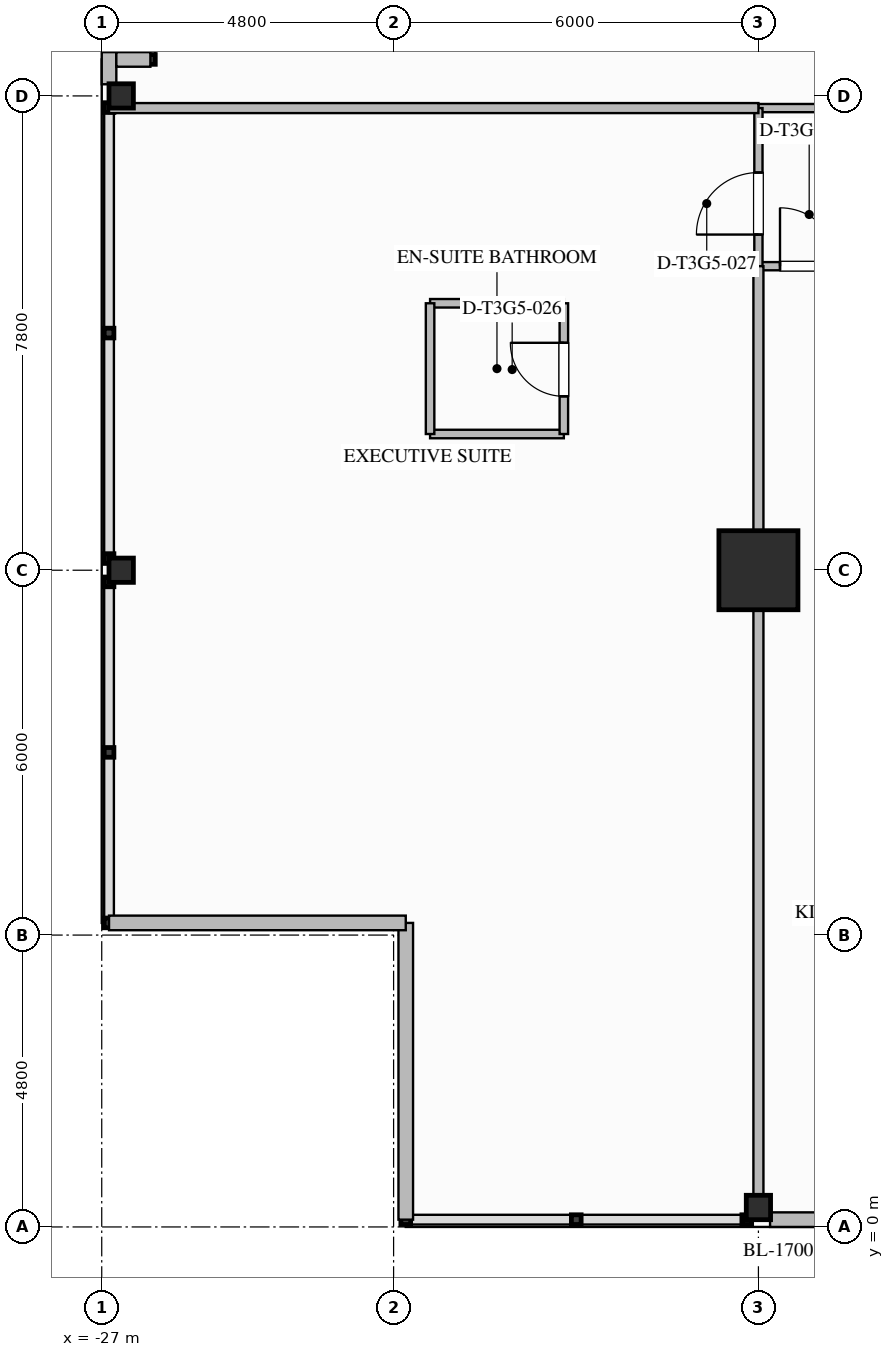
"""IFC4 building model, lengths in metres.
Left out: names, types, materials, properties, quantities, classifications, styles, units other than length and angle.
Written with IfcOpenShell. Run it as: python <this file> out.ifc"""

import sys

from ifc_helpers import new_model, si_unit, direction, frame, frame_2d, origin, origin_2d, place, context, subcontext, project, spatial, rectangle, i_section, extrude, element, fill, save


model = new_model("IFC4")
c1 = context("Model", 3, precision=1e-05, world=origin(), true_north=direction((0.0, 1.0)))
c2 = subcontext(c1, "Body", "Model", "MODEL_VIEW")
j1 = project(units=[si_unit("LENGTHUNIT", "METRE"), si_unit("PLANEANGLEUNIT", "RADIAN")], contexts=[c1])
p1 = place(None, origin())
s1 = spatial("IfcSite", under=j1, at=p1, CompositionType="ELEMENT")
p2 = place(p1, origin())
s2 = spatial("IfcBuilding", under=s1, at=p2, CompositionType="ELEMENT")
p3 = place(p2, frame((0.0, 0.0, 193.0)))
s3 = spatial("IfcBuildingStorey", under=s2, at=p3, CompositionType="ELEMENT", Elevation=193.0)
p4 = place(p3, frame((-16.2, 10.8, 0.0), z_axis=(0.0, 0.0, 1.0), x_axis=(1.0, 0.0, 0.0)))
e1 = element("IfcColumn", 1, at=p4, inside=s3, PredefinedType="COLUMN", context=c2, shape_type="SweptSolid", body=[
    extrude(rectangle(XDim=1.3, YDim=1.3, at=origin_2d()), origin(), (0.0, 0.0, 1.0), 3.55),
])
for number, where, z_axis, x_axis in (
    (2, (-26.68, 10.8, 0.0), (0.0, 0.0, 1.0), (1.0, 0.0, 0.0)),
    (3, (-26.68, 18.6, 0.0), (0.0, 0.0, 1.0), (1.0, 0.0, 0.0)),
    (4, (-16.2, 0.32, 0.0), (0.0, 0.0, 1.0), (0.0, 1.0, 0.0)),
):
    element("IfcColumn", number, at=place(p3, frame(where, z_axis=z_axis, x_axis=x_axis)), inside=s3, PredefinedType="COLUMN", context=c2, shape_type="SweptSolid", body=[
        extrude(i_section(OverallWidth=0.401, OverallDepth=0.399, WebThickness=0.025, FlangeThickness=0.04, FilletRadius=0.025, at=origin_2d()), origin(), (0.0, 0.0, 1.0), 3.547),
    ])
p5 = place(p3, frame((-26.88, 18.792, 0.0), z_axis=(0.0, 0.0, 1.0), x_axis=(0.0, 1.0, 0.0)))
e5 = element("IfcWall", 5, at=p5, inside=s3, PredefinedType="STANDARD", context=c2, shape_type="SweptSolid", body=[
    extrude(rectangle(XDim=0.528, YDim=0.24, at=frame_2d((0.264, 0.0))), origin(), (0.0, 0.0, 1.0), 3.29),
])
p6 = place(p3, frame((-8.592, 0.12, 0.0), z_axis=(0.0, 0.0, 1.0), x_axis=(-1.0, 0.0, 0.0)))
e6 = element("IfcWall", 6, at=p6, inside=s3, PredefinedType="STANDARD", context=c2, shape_type="SweptSolid", body=[
    extrude(rectangle(XDim=7.417, YDim=0.24, at=frame_2d((3.708, 0.0))), origin(), (0.0, 0.0, 1.0), 2.753),
])
p7 = place(p6, frame((1.808, 0.0, 0.0)))
e7 = element("IfcOpeningElement", 7, at=p7, cuts=e6, PredefinedType="OPENING", context=c2, shape_type="SweptSolid", body=[
    extrude(rectangle(XDim=1.0, YDim=2.2, at=frame_2d((0.5, 1.1))), frame((0.0, 0.13, 0.0), z_axis=(0.0, -1.0, 0.0), x_axis=(1.0, 0.0, 0.0)), (0.0, 0.0, 1.0), 0.26),
])
p8 = place(p6, frame((4.037, 0.0, 0.75)))
e8 = element("IfcOpeningElement", 8, at=p8, cuts=e6, PredefinedType="OPENING", context=c2, shape_type="SweptSolid", body=[
    extrude(rectangle(XDim=1.8, YDim=1.903, at=frame_2d((0.9, 0.952))), frame((0.0, 0.13, 0.0), z_axis=(0.0, -1.0, 0.0), x_axis=(1.0, 0.0, 0.0)), (0.0, 0.0, 1.0), 0.26),
])
for number, where, z_axis, x_axis in (
    (9, (-22.0, 0.12, 0.0), (0.0, 0.0, 1.0), (0.0, 1.0, 0.0)),
    (10, (-22.0, 5.0, 0.0), (0.0, 0.0, 1.0), (-1.0, 0.0, 0.0)),
):
    element("IfcWall", number, at=place(p3, frame(where, z_axis=z_axis, x_axis=x_axis)), inside=s3, PredefinedType="STANDARD", context=c2, shape_type="SweptSolid", body=[
        extrude(rectangle(XDim=4.88, YDim=0.24, at=frame_2d((2.44, 0.0))), origin(), (0.0, 0.0, 1.0), 3.29),
    ])
p9 = place(p3, frame((-26.76, 19.2, 0.0), z_axis=(0.0, 0.0, 1.0), x_axis=(1.0, 0.0, 0.0)))
e11 = element("IfcWall", 11, at=p9, inside=s3, PredefinedType="STANDARD", context=c2, shape_type="SweptSolid", body=[
    extrude(rectangle(XDim=0.56, YDim=0.24, at=frame_2d((0.28, 0.0))), origin(), (0.0, 0.0, 1.0), 3.29),
])
p10 = place(p3, frame((-16.2, 18.4, 0.0), z_axis=(0.0, 0.0, 1.0), x_axis=(1.0, 0.0, 0.0)))
e12 = element("IfcWall", 12, at=p10, inside=s3, PredefinedType="PARTITIONING", context=c2, shape_type="SweptSolid", body=[
    extrude(rectangle(XDim=5.5, YDim=0.135, at=frame_2d((2.75, 0.0))), origin(), (0.0, 0.0, 1.0), 2.667),
])
p11 = place(p3, frame((-16.2, 15.8, 0.0), z_axis=(0.0, 0.0, 1.0), x_axis=(1.0, 0.0, 0.0)))
e13 = element("IfcWall", 13, at=p11, inside=s3, PredefinedType="PARTITIONING", context=c2, shape_type="SweptSolid", body=[
    extrude(rectangle(XDim=24.8, YDim=0.135, at=frame_2d((12.4, 0.0))), origin(), (0.0, 0.0, 1.0), 3.29),
])
p12 = place(p11, frame((0.355, 0.0, 0.0)))
e14 = element("IfcOpeningElement", 14, at=p12, cuts=e13, PredefinedType="OPENING", context=c2, shape_type="SweptSolid", body=[
    extrude(rectangle(XDim=0.96, YDim=2.15, at=frame_2d((0.48, 1.075))), frame((0.0, 0.077, 0.0), z_axis=(0.0, -1.0, 0.0), x_axis=(1.0, 0.0, 0.0)), (0.0, 0.0, 1.0), 0.155),
])
p13 = place(p11, frame((7.766, 0.0, 0.0)))
e15 = element("IfcOpeningElement", 15, at=p13, cuts=e13, PredefinedType="OPENING", context=c2, shape_type="SweptSolid", body=[
    extrude(rectangle(XDim=1.26, YDim=2.2, at=frame_2d((0.63, 1.1))), frame((0.0, 0.077, 0.0), z_axis=(0.0, -1.0, 0.0), x_axis=(1.0, 0.0, 0.0)), (0.0, 0.0, 1.0), 0.155),
])
p14 = place(p11, frame((11.89, 0.0, 0.0)))
e16 = element("IfcOpeningElement", 16, at=p14, cuts=e13, PredefinedType="OPENING", context=c2, shape_type="SweptSolid", body=[
    extrude(rectangle(XDim=1.02, YDim=2.15, at=frame_2d((0.51, 1.075))), frame((0.0, 0.077, 0.0), z_axis=(0.0, -1.0, 0.0), x_axis=(1.0, 0.0, 0.0)), (0.0, 0.0, 1.0), 0.155),
])
p15 = place(p11, frame((18.116, 0.0, 0.0)))
e17 = element("IfcOpeningElement", 17, at=p15, cuts=e13, PredefinedType="OPENING", context=c2, shape_type="SweptSolid", body=[
    extrude(rectangle(XDim=1.26, YDim=2.2, at=frame_2d((0.63, 1.1))), frame((0.0, 0.077, 0.0), z_axis=(0.0, -1.0, 0.0), x_axis=(1.0, 0.0, 0.0)), (0.0, 0.0, 1.0), 0.155),
])
p16 = place(p11, frame((20.967, 0.0, 0.0)))
e18 = element("IfcOpeningElement", 18, at=p16, cuts=e13, PredefinedType="OPENING", context=c2, shape_type="SweptSolid", body=[
    extrude(rectangle(XDim=0.96, YDim=2.15, at=frame_2d((0.48, 1.075))), frame((0.0, 0.077, 0.0), z_axis=(0.0, -1.0, 0.0), x_axis=(1.0, 0.0, 0.0)), (0.0, 0.0, 1.0), 0.155),
])
p17 = place(p3, frame((-16.2, 15.8, 0.0), z_axis=(0.0, 0.0, 1.0), x_axis=(0.0, 1.0, 0.0)))
e19 = element("IfcWall", 19, at=p17, inside=s3, PredefinedType="PARTITIONING", context=c2, shape_type="SweptSolid", body=[
    extrude(rectangle(XDim=2.6, YDim=0.135, at=frame_2d((1.3, 0.0))), origin(), (0.0, 0.0, 1.0), 2.58),
])
p18 = place(p17, frame((0.52, 0.0, 0.0)))
e20 = element("IfcOpeningElement", 20, at=p18, cuts=e19, PredefinedType="OPENING", context=c2, shape_type="SweptSolid", body=[
    extrude(rectangle(XDim=1.02, YDim=2.15, at=frame_2d((0.51, 1.075))), frame((0.0, 0.077, 0.0), z_axis=(0.0, -1.0, 0.0), x_axis=(1.0, 0.0, 0.0)), (0.0, 0.0, 1.0), 0.155),
])
p19 = place(p3, frame((-16.2, 0.12, 0.0), z_axis=(0.0, 0.0, 1.0), x_axis=(0.0, 1.0, 0.0)))
e21 = element("IfcWall", 21, at=p19, inside=s3, PredefinedType="PARTITIONING", context=c2, shape_type="SweptSolid", body=[
    extrude(rectangle(XDim=15.68, YDim=0.165, at=frame_2d((7.84, 0.0))), origin(), (0.0, 0.0, 1.0), 2.58),
])
p20 = place(p3, frame((-26.88, 18.4, 0.0), z_axis=(0.0, 0.0, 1.0), x_axis=(1.0, 0.0, 0.0)))
e22 = element("IfcWall", 22, at=p20, inside=s3, PredefinedType="PARTITIONING", context=c2, shape_type="SweptSolid", body=[
    extrude(rectangle(XDim=10.68, YDim=0.165, at=frame_2d((5.34, 0.0))), origin(), (0.0, 0.0, 1.0), 2.58),
])
for number, where, z_axis, x_axis in (
    (23, (-21.6, 13.04, 0.0), (0.0, 0.0, 1.0), (1.0, 0.0, 0.0)),
    (24, (-21.6, 15.19, 0.0), (0.0, 0.0, 1.0), (1.0, 0.0, 0.0)),
):
    element("IfcWall", number, at=place(p3, frame(where, z_axis=z_axis, x_axis=x_axis)), inside=s3, PredefinedType="PLUMBINGWALL", context=c2, shape_type="SweptSolid", body=[
        extrude(rectangle(XDim=2.2, YDim=0.14, at=frame_2d((1.1, 0.0))), origin(), (0.0, 0.0, 1.0), 3.29),
    ])
p21 = place(p3, frame((-21.6, 13.04, 0.0), z_axis=(0.0, 0.0, 1.0), x_axis=(0.0, 1.0, 0.0)))
e25 = element("IfcWall", 25, at=p21, inside=s3, PredefinedType="PLUMBINGWALL", context=c2, shape_type="SweptSolid", body=[
    extrude(rectangle(XDim=2.15, YDim=0.14, at=frame_2d((1.075, 0.0))), origin(), (0.0, 0.0, 1.0), 3.29),
])
p22 = place(p3, frame((-19.4, 13.04, 0.0), z_axis=(0.0, 0.0, 1.0), x_axis=(0.0, 1.0, 0.0)))
e26 = element("IfcWall", 26, at=p22, inside=s3, PredefinedType="PLUMBINGWALL", context=c2, shape_type="SweptSolid", body=[
    extrude(rectangle(XDim=2.15, YDim=0.14, at=frame_2d((1.075, 0.0))), origin(), (0.0, 0.0, 1.0), 3.29),
])
p23 = place(p22, frame((0.62, 0.0, 0.0)))
e27 = element("IfcOpeningElement", 27, at=p23, cuts=e26, PredefinedType="OPENING", context=c2, shape_type="SweptSolid", body=[
    extrude(rectangle(XDim=0.88, YDim=2.1, at=frame_2d((0.44, 1.05))), frame((0.0, 0.08, 0.0), z_axis=(0.0, -1.0, 0.0), x_axis=(1.0, 0.0, 0.0)), (0.0, 0.0, 1.0), 0.16),
])
p24 = place(p23, origin())
e28 = element("IfcDoor", 28, at=p24, inside=s3, OperationType="SINGLE_SWING_RIGHT", PredefinedType="DOOR", context=c2, shape_type="SweptSolid", body=[
    extrude(rectangle(XDim=0.88, YDim=2.1, at=frame_2d((0.44, 1.05))), frame((0.0, 0.025, 0.0), z_axis=(0.0, -1.0, 0.0), x_axis=(1.0, 0.0, 0.0)), (0.0, 0.0, 1.0), 0.05),
])
fill(e27, e28)
p25 = place(p18, origin())
e29 = element("IfcDoor", 29, at=p25, inside=s3, OperationType="SINGLE_SWING_LEFT", PredefinedType="DOOR", context=c2, shape_type="SweptSolid", body=[
    extrude(rectangle(XDim=1.02, YDim=2.15, at=frame_2d((0.51, 1.075))), frame((0.0, 0.025, 0.0), z_axis=(0.0, -1.0, 0.0), x_axis=(1.0, 0.0, 0.0)), (0.0, 0.0, 1.0), 0.05),
])
fill(e20, e29)
p26 = place(p12, origin())
e30 = element("IfcDoor", 30, at=p26, inside=s3, OperationType="SINGLE_SWING_LEFT", PredefinedType="DOOR", context=c2, shape_type="SweptSolid", body=[
    extrude(rectangle(XDim=0.96, YDim=2.15, at=frame_2d((0.48, 1.075))), frame((0.0, 0.025, 0.0), z_axis=(0.0, -1.0, 0.0), x_axis=(1.0, 0.0, 0.0)), (0.0, 0.0, 1.0), 0.05),
])
fill(e14, e30)
save(model, sys.argv[1])
